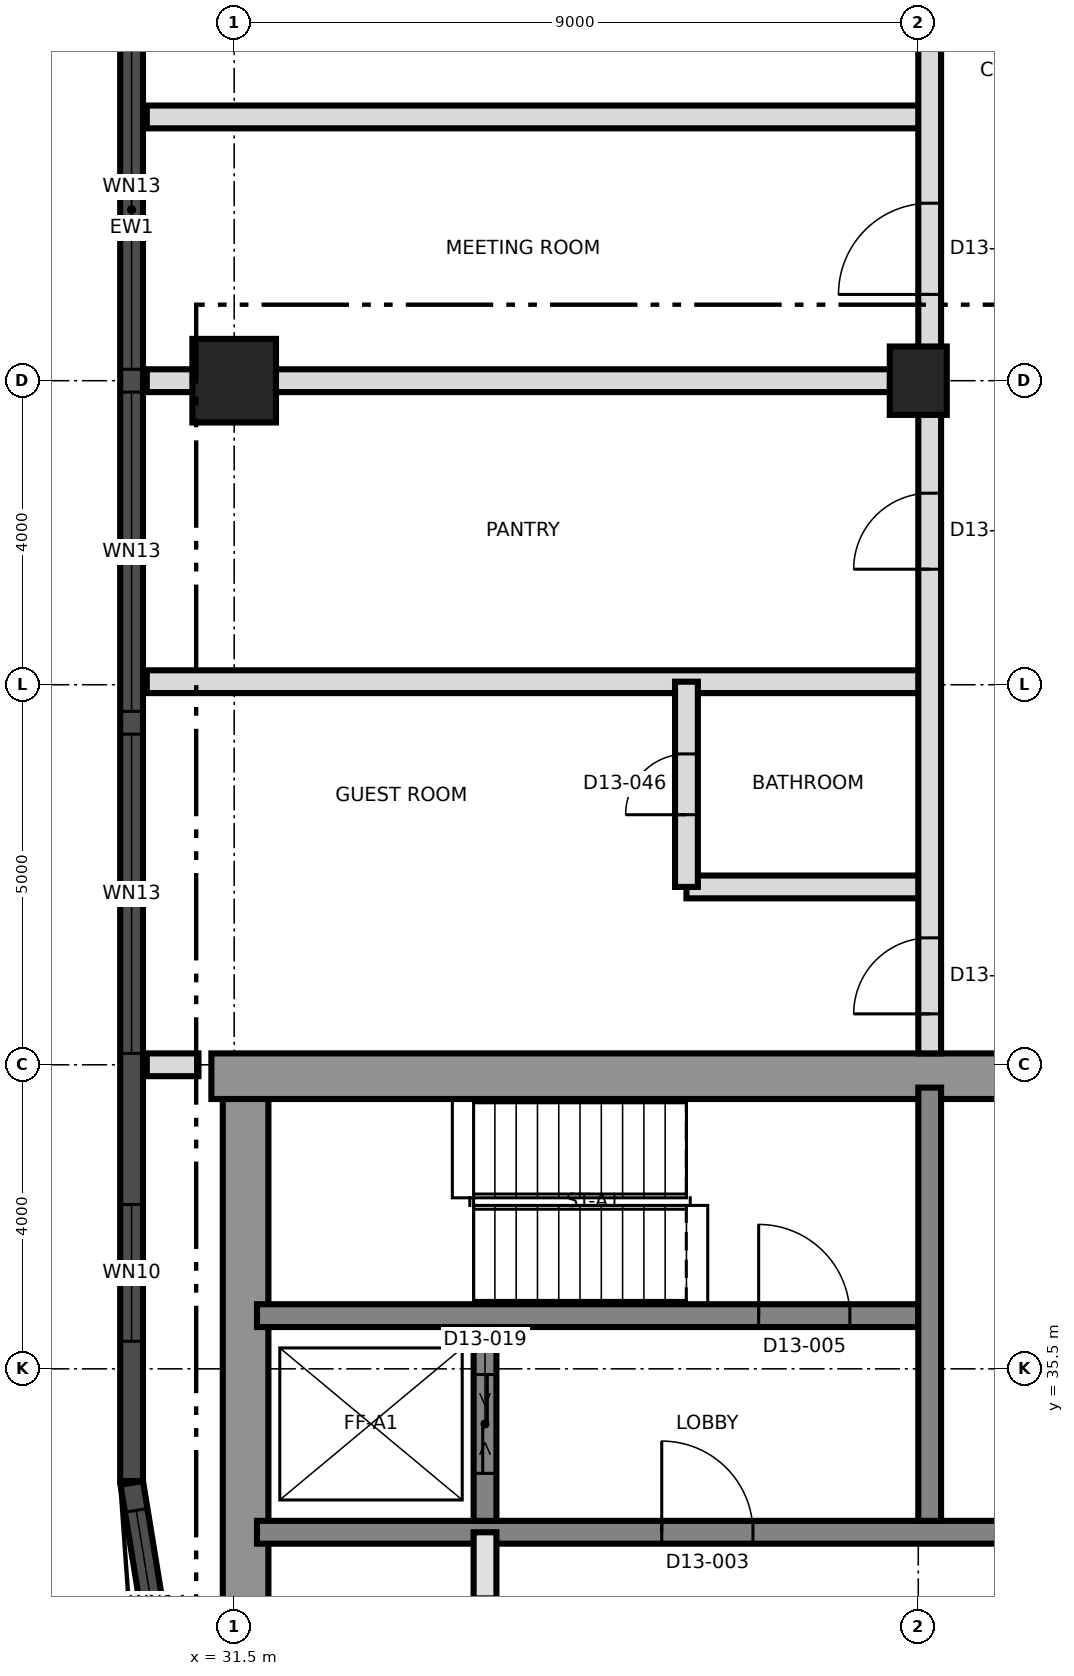
"""IFC4 building model, lengths in metres.
Left out: names, types, materials, properties, quantities, classifications, styles, units other than length and angle.
Written with IfcOpenShell. Run it as: python <this file> out.ifc"""

import sys

from ifc_helpers import new_model, si_unit, direction, frame, frame_2d, origin, origin_2d, place, context, subcontext, project, spatial, rectangle, extrude, element, fill, save


model = new_model("IFC4")
c1 = context("Model", 3, precision=1e-05, world=origin(), true_north=direction((0.0, 1.0)))
c2 = subcontext(c1, "Body", "Model", "MODEL_VIEW")
j1 = project(units=[si_unit("LENGTHUNIT", "METRE"), si_unit("PLANEANGLEUNIT", "RADIAN")], contexts=[c1])
p1 = place(None, origin())
s1 = spatial("IfcSite", under=j1, at=p1, CompositionType="ELEMENT")
p2 = place(p1, origin())
s2 = spatial("IfcBuilding", under=s1, at=p2, CompositionType="ELEMENT")
p3 = place(p2, frame((0.0, 0.0, 145.9)))
s3 = spatial("IfcBuildingStorey", under=s2, at=p3, CompositionType="ELEMENT", Elevation=145.9)
p4 = place(p3, frame((31.65, 21.8, 0.0), z_axis=(0.0, 0.0, 1.0), x_axis=(0.0, 1.0, 0.0)))
e1 = element("IfcWall", 1, at=p4, inside=s3, PredefinedType="SHEAR", context=c2, shape_type="SweptSolid", body=[
    extrude(rectangle(XDim=17.4, YDim=0.6, at=frame_2d((8.7, 0.0))), origin(), (0.0, 0.0, 1.0), 3.7),
])
p5 = place(p3, frame((31.2, 39.35, 0.0), z_axis=(0.0, 0.0, 1.0), x_axis=(1.0, 0.0, 0.0)))
e2 = element("IfcWall", 2, at=p5, inside=s3, PredefinedType="SHEAR", context=c2, shape_type="SweptSolid", body=[
    extrude(rectangle(XDim=27.0, YDim=0.6, at=frame_2d((13.5, 0.0))), origin(), (0.0, 0.0, 1.0), 3.7),
])
p6 = place(p5, frame((10.5, 0.0, 0.0)))
e3 = element("IfcOpeningElement", 3, at=p6, cuts=e2, PredefinedType="OPENING", context=c2, shape_type="SweptSolid", body=[
    extrude(rectangle(XDim=1.2, YDim=2.1, at=frame_2d((0.6, 1.05))), frame((0.0, 0.31, 0.0), z_axis=(0.0, -1.0, 0.0), x_axis=(1.0, 0.0, 0.0)), (0.0, 0.0, 1.0), 0.62),
])
p7 = place(p3, frame((31.8, 33.35, 0.0), z_axis=(0.0, 0.0, 1.0), x_axis=(1.0, 0.0, 0.0)))
e4 = element("IfcWall", 4, at=p7, inside=s3, PredefinedType="SHEAR", context=c2, shape_type="SweptSolid", body=[
    extrude(rectangle(XDim=26.4, YDim=0.3, at=frame_2d((13.2, 0.0))), origin(), (0.0, 0.0, 1.0), 3.7),
])
p8 = place(p7, frame((13.85, 0.0, 0.0)))
e5 = element("IfcOpeningElement", 5, at=p8, cuts=e4, PredefinedType="OPENING", context=c2, shape_type="SweptSolid", body=[
    extrude(rectangle(XDim=1.4, YDim=2.1, at=frame_2d((0.7, 1.05))), frame((0.0, 0.16, 0.0), z_axis=(0.0, -1.0, 0.0), x_axis=(1.0, 0.0, 0.0)), (0.0, 0.0, 1.0), 0.32),
])
p9 = place(p7, frame((5.325, 0.0, 0.0)))
e6 = element("IfcOpeningElement", 6, at=p9, cuts=e4, PredefinedType="OPENING", context=c2, shape_type="SweptSolid", body=[
    extrude(rectangle(XDim=1.2, YDim=2.1, at=frame_2d((0.6, 1.05))), frame((0.0, 0.16, 0.0), z_axis=(0.0, -1.0, 0.0), x_axis=(1.0, 0.0, 0.0)), (0.0, 0.0, 1.0), 0.32),
])
p10 = place(p7, frame((19.875, 0.0, 0.0)))
e7 = element("IfcOpeningElement", 7, at=p10, cuts=e4, PredefinedType="OPENING", context=c2, shape_type="SweptSolid", body=[
    extrude(rectangle(XDim=1.2, YDim=2.1, at=frame_2d((0.6, 1.05))), frame((0.0, 0.16, 0.0), z_axis=(0.0, -1.0, 0.0), x_axis=(1.0, 0.0, 0.0)), (0.0, 0.0, 1.0), 0.32),
])
p11 = place(p3, frame((31.8, 36.2, 0.0), z_axis=(0.0, 0.0, 1.0), x_axis=(1.0, 0.0, 0.0)))
e8 = element("IfcWall", 8, at=p11, inside=s3, PredefinedType="SHEAR", context=c2, shape_type="SweptSolid", body=[
    extrude(rectangle(XDim=8.7, YDim=0.3, at=frame_2d((4.35, 0.0))), origin(), (0.0, 0.0, 1.0), 3.7),
])
p12 = place(p11, frame((6.6, 0.0, 0.0)))
e9 = element("IfcOpeningElement", 9, at=p12, cuts=e8, PredefinedType="OPENING", context=c2, shape_type="SweptSolid", body=[
    extrude(rectangle(XDim=1.2, YDim=2.1, at=frame_2d((0.6, 1.05))), frame((0.0, 0.16, 0.0), z_axis=(0.0, -1.0, 0.0), x_axis=(1.0, 0.0, 0.0)), (0.0, 0.0, 1.0), 0.32),
])
p13 = place(p3, frame((40.65, 33.5, 0.0), z_axis=(0.0, 0.0, 1.0), x_axis=(0.0, 1.0, 0.0)))
e10 = element("IfcWall", 10, at=p13, inside=s3, PredefinedType="SHEAR", context=c2, shape_type="SweptSolid", body=[
    extrude(rectangle(XDim=5.7, YDim=0.3, at=frame_2d((2.85, 0.0))), origin(), (0.0, 0.0, 1.0), 3.7),
])
p14 = place(p3, frame((34.8, 33.5, 0.0), z_axis=(0.0, 0.0, 1.0), x_axis=(0.0, 1.0, 0.0)))
e11 = element("IfcWall", 11, at=p14, inside=s3, PredefinedType="SHEAR", context=c2, shape_type="SweptSolid", body=[
    extrude(rectangle(XDim=2.55, YDim=0.3, at=frame_2d((1.275, 0.0))), origin(), (0.0, 0.0, 1.0), 3.7),
])
p15 = place(p14, frame((0.625, 0.0, 0.0)))
e12 = element("IfcOpeningElement", 12, at=p15, cuts=e11, PredefinedType="OPENING", context=c2, shape_type="SweptSolid", body=[
    extrude(rectangle(XDim=1.3, YDim=2.4, at=frame_2d((0.65, 1.2))), frame((0.0, 0.16, 0.0), z_axis=(0.0, -1.0, 0.0), x_axis=(1.0, 0.0, 0.0)), (0.0, 0.0, 1.0), 0.32),
])
p16 = place(p3, frame((31.5, 48.5, 0.0), z_axis=(0.0, 0.0, 1.0), x_axis=(1.0, 0.0, 0.0)))
e13 = element("IfcColumn", 13, at=p16, inside=s3, PredefinedType="COLUMN", context=c2, shape_type="SweptSolid", body=[
    extrude(rectangle(XDim=1.1, YDim=1.1, at=origin_2d()), origin(), (0.0, 0.0, 1.0), 3.7),
])
p17 = place(p3, frame((40.5, 48.5, 0.0), z_axis=(0.0, 0.0, 1.0), x_axis=(0.0, 1.0, 0.0)))
e14 = element("IfcColumn", 14, at=p17, inside=s3, PredefinedType="COLUMN", context=c2, shape_type="SweptSolid", body=[
    extrude(rectangle(XDim=0.9, YDim=0.75, at=origin_2d()), origin(), (0.0, 0.0, 1.0), 3.7),
])
p18 = place(p3, frame((30.15, 66.992, 0.0), z_axis=(0.0, 0.0, 1.0), x_axis=(0.0, -1.0, 0.0)))
e15 = element("IfcWall", 15, at=p18, inside=s3, PredefinedType="SOLIDWALL", context=c2, shape_type="SweptSolid", body=[
    extrude(rectangle(XDim=32.968, YDim=0.3, at=frame_2d((16.484, 0.0))), origin(), (0.0, 0.0, 1.0), 3.4),
])
p19 = place(p18, frame((1.596, 0.0, 0.3)))
e16 = element("IfcOpeningElement", 16, at=p19, cuts=e15, PredefinedType="OPENING", context=c2, shape_type="SweptSolid", body=[
    extrude(rectangle(XDim=1.8, YDim=2.4, at=frame_2d((0.9, 1.2))), frame((0.0, 0.16, 0.0), z_axis=(0.0, -1.0, 0.0), x_axis=(1.0, 0.0, 0.0)), (0.0, 0.0, 1.0), 0.32),
])
p20 = place(p18, frame((5.142, 0.0, 0.9)))
e17 = element("IfcOpeningElement", 17, at=p20, cuts=e15, PredefinedType="OPENING", context=c2, shape_type="SweptSolid", body=[
    extrude(rectangle(XDim=4.2, YDim=1.7, at=frame_2d((2.1, 0.85))), frame((0.0, 0.16, 0.0), z_axis=(0.0, -1.0, 0.0), x_axis=(1.0, 0.0, 0.0)), (0.0, 0.0, 1.0), 0.32),
])
p21 = place(p18, frame((9.642, 0.0, 0.9)))
e18 = element("IfcOpeningElement", 18, at=p21, cuts=e15, PredefinedType="OPENING", context=c2, shape_type="SweptSolid", body=[
    extrude(rectangle(XDim=4.2, YDim=1.7, at=frame_2d((2.1, 0.85))), frame((0.0, 0.16, 0.0), z_axis=(0.0, -1.0, 0.0), x_axis=(1.0, 0.0, 0.0)), (0.0, 0.0, 1.0), 0.32),
])
p22 = place(p18, frame((14.142, 0.0, 0.9)))
e19 = element("IfcOpeningElement", 19, at=p22, cuts=e15, PredefinedType="OPENING", context=c2, shape_type="SweptSolid", body=[
    extrude(rectangle(XDim=4.2, YDim=1.7, at=frame_2d((2.1, 0.85))), frame((0.0, 0.16, 0.0), z_axis=(0.0, -1.0, 0.0), x_axis=(1.0, 0.0, 0.0)), (0.0, 0.0, 1.0), 0.32),
])
p23 = place(p18, frame((18.642, 0.0, 0.9)))
e20 = element("IfcOpeningElement", 20, at=p23, cuts=e15, PredefinedType="OPENING", context=c2, shape_type="SweptSolid", body=[
    extrude(rectangle(XDim=4.2, YDim=1.7, at=frame_2d((2.1, 0.85))), frame((0.0, 0.16, 0.0), z_axis=(0.0, -1.0, 0.0), x_axis=(1.0, 0.0, 0.0)), (0.0, 0.0, 1.0), 0.32),
])
p24 = place(p18, frame((23.142, 0.0, 0.9)))
e21 = element("IfcOpeningElement", 21, at=p24, cuts=e15, PredefinedType="OPENING", context=c2, shape_type="SweptSolid", body=[
    extrude(rectangle(XDim=4.2, YDim=1.7, at=frame_2d((2.1, 0.85))), frame((0.0, 0.16, 0.0), z_axis=(0.0, -1.0, 0.0), x_axis=(1.0, 0.0, 0.0)), (0.0, 0.0, 1.0), 0.32),
])
p25 = place(p18, frame((29.33, 0.0, 0.3)))
e22 = element("IfcOpeningElement", 22, at=p25, cuts=e15, PredefinedType="OPENING", context=c2, shape_type="SweptSolid", body=[
    extrude(rectangle(XDim=1.8, YDim=2.4, at=frame_2d((0.9, 1.2))), frame((0.0, 0.16, 0.0), z_axis=(0.0, -1.0, 0.0), x_axis=(1.0, 0.0, 0.0)), (0.0, 0.0, 1.0), 0.32),
])
p26 = place(p3, frame((30.152, 34.0, 0.0), z_axis=(0.0, 0.0, 1.0), x_axis=(0.160697303067, -0.987003736967, 0.0)))
e23 = element("IfcWall", 23, at=p26, inside=s3, PredefinedType="SOLIDWALL", context=c2, shape_type="SweptSolid", body=[
    extrude(rectangle(XDim=4.333, YDim=0.3, at=frame_2d((2.167, 0.0))), origin(), (0.0, 0.0, 1.0), 3.4),
])
p27 = place(p26, frame((0.366, 0.0, 0.9)))
e24 = element("IfcOpeningElement", 24, at=p27, cuts=e23, PredefinedType="OPENING", context=c2, shape_type="SweptSolid", body=[
    extrude(rectangle(XDim=3.6, YDim=1.7, at=frame_2d((1.8, 0.85))), frame((0.0, 0.16, 0.0), z_axis=(0.0, -1.0, 0.0), x_axis=(1.0, 0.0, 0.0)), (0.0, 0.0, 1.0), 0.32),
])
p28 = place(p3, frame((34.8, 30.65, 0.0), z_axis=(0.0, 0.0, 1.0), x_axis=(0.0, 1.0, 0.0)))
e25 = element("IfcWall", 25, at=p28, inside=s3, PredefinedType="SOLIDWALL", context=c2, shape_type="SweptSolid", body=[
    extrude(rectangle(XDim=2.7, YDim=0.3, at=frame_2d((1.35, 0.0))), origin(), (0.0, 0.0, 1.0), 3.4),
])
p29 = place(p28, frame((0.85, 0.0, 0.0)))
e26 = element("IfcOpeningElement", 26, at=p29, cuts=e25, PredefinedType="OPENING", context=c2, shape_type="SweptSolid", body=[
    extrude(rectangle(XDim=1.0, YDim=2.1, at=frame_2d((0.5, 1.05))), frame((0.0, 0.16, 0.0), z_axis=(0.0, -1.0, 0.0), x_axis=(1.0, 0.0, 0.0)), (0.0, 0.0, 1.0), 0.32),
])
p30 = place(p3, frame((30.35, 39.5, 0.0), z_axis=(0.0, 0.0, 1.0), x_axis=(1.0, 0.0, 0.0)))
e27 = element("IfcWall", 27, at=p30, inside=s3, PredefinedType="PARTITIONING", context=c2, shape_type="SweptSolid", body=[
    extrude(rectangle(XDim=0.68, YDim=0.3, at=frame_2d((0.34, 0.0))), origin(), (0.0, 0.0, 1.0), 3.4),
])
p31 = place(p3, frame((37.45, 41.84, 0.0), z_axis=(0.0, 0.0, 1.0), x_axis=(1.0, 0.0, 0.0)))
e28 = element("IfcWall", 28, at=p31, inside=s3, PredefinedType="PARTITIONING", context=c2, shape_type="SweptSolid", body=[
    extrude(rectangle(XDim=3.2, YDim=0.3, at=frame_2d((1.6, 0.0))), origin(), (0.0, 0.0, 1.0), 3.4),
])
for number, where, z_axis, x_axis in (
    (29, (30.35, 44.54, 0.0), (0.0, 0.0, 1.0), (1.0, 0.0, 0.0)),
    (30, (30.35, 48.5, 0.0), (0.0, 0.0, 1.0), (1.0, 0.0, 0.0)),
    (31, (30.35, 51.97, 0.0), (0.0, 0.0, 1.0), (1.0, 0.0, 0.0)),
):
    element("IfcWall", number, at=place(p3, frame(where, z_axis=z_axis, x_axis=x_axis)), inside=s3, PredefinedType="PARTITIONING", context=c2, shape_type="SweptSolid", body=[
        extrude(rectangle(XDim=10.3, YDim=0.3, at=frame_2d((5.15, 0.0))), origin(), (0.0, 0.0, 1.0), 3.4),
    ])
p32 = place(p3, frame((37.45, 41.84, 0.0), z_axis=(0.0, 0.0, 1.0), x_axis=(0.0, 1.0, 0.0)))
e32 = element("IfcWall", 32, at=p32, inside=s3, PredefinedType="PARTITIONING", context=c2, shape_type="SweptSolid", body=[
    extrude(rectangle(XDim=2.7, YDim=0.3, at=frame_2d((1.35, 0.0))), origin(), (0.0, 0.0, 1.0), 3.4),
])
p33 = place(p32, frame((0.95, 0.0, 0.0)))
e33 = element("IfcOpeningElement", 33, at=p33, cuts=e32, PredefinedType="OPENING", context=c2, shape_type="SweptSolid", body=[
    extrude(rectangle(XDim=0.8, YDim=2.1, at=frame_2d((0.4, 1.05))), frame((0.0, 0.16, 0.0), z_axis=(0.0, -1.0, 0.0), x_axis=(1.0, 0.0, 0.0)), (0.0, 0.0, 1.0), 0.32),
])
p34 = place(p3, frame((40.65, 39.65, 0.0), z_axis=(0.0, 0.0, 1.0), x_axis=(0.0, 1.0, 0.0)))
e34 = element("IfcWall", 34, at=p34, inside=s3, PredefinedType="PARTITIONING", context=c2, shape_type="SweptSolid", body=[
    extrude(rectangle(XDim=37.24, YDim=0.3, at=frame_2d((18.62, 0.0))), origin(), (0.0, 0.0, 1.0), 3.4),
])
p35 = place(p34, frame((0.52, 0.0, 0.0)))
e35 = element("IfcOpeningElement", 35, at=p35, cuts=e34, PredefinedType="OPENING", context=c2, shape_type="SweptSolid", body=[
    extrude(rectangle(XDim=1.0, YDim=2.1, at=frame_2d((0.5, 1.05))), frame((0.0, 0.16, 0.0), z_axis=(0.0, -1.0, 0.0), x_axis=(1.0, 0.0, 0.0)), (0.0, 0.0, 1.0), 0.32),
])
p36 = place(p34, frame((6.37, 0.0, 0.0)))
e36 = element("IfcOpeningElement", 36, at=p36, cuts=e34, PredefinedType="OPENING", context=c2, shape_type="SweptSolid", body=[
    extrude(rectangle(XDim=1.0, YDim=2.1, at=frame_2d((0.5, 1.05))), frame((0.0, 0.16, 0.0), z_axis=(0.0, -1.0, 0.0), x_axis=(1.0, 0.0, 0.0)), (0.0, 0.0, 1.0), 0.32),
])
p37 = place(p34, frame((9.985, 0.0, 0.0)))
e37 = element("IfcOpeningElement", 37, at=p37, cuts=e34, PredefinedType="OPENING", context=c2, shape_type="SweptSolid", body=[
    extrude(rectangle(XDim=1.2, YDim=2.1, at=frame_2d((0.6, 1.05))), frame((0.0, 0.16, 0.0), z_axis=(0.0, -1.0, 0.0), x_axis=(1.0, 0.0, 0.0)), (0.0, 0.0, 1.0), 0.32),
])
p38 = place(p34, frame((13.235, 0.0, 0.0)))
e38 = element("IfcOpeningElement", 38, at=p38, cuts=e34, PredefinedType="OPENING", context=c2, shape_type="SweptSolid", body=[
    extrude(rectangle(XDim=1.0, YDim=2.1, at=frame_2d((0.5, 1.05))), frame((0.0, 0.16, 0.0), z_axis=(0.0, -1.0, 0.0), x_axis=(1.0, 0.0, 0.0)), (0.0, 0.0, 1.0), 0.32),
])
p39 = place(p34, frame((21.35, 0.0, 0.0)))
e39 = element("IfcOpeningElement", 39, at=p39, cuts=e34, PredefinedType="OPENING", context=c2, shape_type="SweptSolid", body=[
    extrude(rectangle(XDim=1.0, YDim=2.4, at=frame_2d((0.5, 1.2))), frame((0.0, 0.16, 0.0), z_axis=(0.0, -1.0, 0.0), x_axis=(1.0, 0.0, 0.0)), (0.0, 0.0, 1.0), 0.32),
])
p40 = place(p22, origin())
e40 = element("IfcWindow", 40, at=p40, inside=s3, PartitioningType="SINGLE_PANEL", PredefinedType="WINDOW", context=c2, shape_type="SweptSolid", body=[
    extrude(rectangle(XDim=4.2, YDim=1.7, at=frame_2d((2.1, 0.85))), frame((0.0, 0.03, 0.0), z_axis=(0.0, -1.0, 0.0), x_axis=(1.0, 0.0, 0.0)), (0.0, 0.0, 1.0), 0.06),
])
fill(e19, e40)
p41 = place(p23, origin())
e41 = element("IfcWindow", 41, at=p41, inside=s3, PartitioningType="SINGLE_PANEL", PredefinedType="WINDOW", context=c2, shape_type="SweptSolid", body=[
    extrude(rectangle(XDim=4.2, YDim=1.7, at=frame_2d((2.1, 0.85))), frame((0.0, 0.03, 0.0), z_axis=(0.0, -1.0, 0.0), x_axis=(1.0, 0.0, 0.0)), (0.0, 0.0, 1.0), 0.06),
])
fill(e20, e41)
p42 = place(p24, origin())
e42 = element("IfcWindow", 42, at=p42, inside=s3, PartitioningType="SINGLE_PANEL", PredefinedType="WINDOW", context=c2, shape_type="SweptSolid", body=[
    extrude(rectangle(XDim=4.2, YDim=1.7, at=frame_2d((2.1, 0.85))), frame((0.0, 0.03, 0.0), z_axis=(0.0, -1.0, 0.0), x_axis=(1.0, 0.0, 0.0)), (0.0, 0.0, 1.0), 0.06),
])
fill(e21, e42)
p43 = place(p25, origin())
e43 = element("IfcWindow", 43, at=p43, inside=s3, PartitioningType="SINGLE_PANEL", PredefinedType="WINDOW", context=c2, shape_type="SweptSolid", body=[
    extrude(rectangle(XDim=1.8, YDim=2.4, at=frame_2d((0.9, 1.2))), frame((0.0, 0.03, 0.0), z_axis=(0.0, -1.0, 0.0), x_axis=(1.0, 0.0, 0.0)), (0.0, 0.0, 1.0), 0.06),
])
fill(e22, e43)
p44 = place(p27, origin())
e44 = element("IfcWindow", 44, at=p44, inside=s3, PartitioningType="SINGLE_PANEL", PredefinedType="WINDOW", context=c2, shape_type="SweptSolid", body=[
    extrude(rectangle(XDim=3.6, YDim=1.7, at=frame_2d((1.8, 0.85))), frame((0.0, 0.03, 0.0), z_axis=(0.0, -1.0, 0.0), x_axis=(1.0, 0.0, 0.0)), (0.0, 0.0, 1.0), 0.06),
])
fill(e24, e44)
p45 = place(p9, origin())
e45 = element("IfcDoor", 45, at=p45, inside=s3, OperationType="SINGLE_SWING_LEFT", PredefinedType="DOOR", context=c2, shape_type="SweptSolid", body=[
    extrude(rectangle(XDim=1.2, YDim=2.1, at=frame_2d((0.6, 1.05))), frame((0.0, 0.025, 0.0), z_axis=(0.0, -1.0, 0.0), x_axis=(1.0, 0.0, 0.0)), (0.0, 0.0, 1.0), 0.05),
])
fill(e6, e45)
p46 = place(p12, origin())
e46 = element("IfcDoor", 46, at=p46, inside=s3, OperationType="SINGLE_SWING_RIGHT", PredefinedType="DOOR", context=c2, shape_type="SweptSolid", body=[
    extrude(rectangle(XDim=1.2, YDim=2.1, at=frame_2d((0.6, 1.05))), frame((0.0, 0.025, 0.0), z_axis=(0.0, -1.0, 0.0), x_axis=(1.0, 0.0, 0.0)), (0.0, 0.0, 1.0), 0.05),
])
fill(e9, e46)
p47 = place(p15, origin())
e47 = element("IfcDoor", 47, at=p47, inside=s3, OperationType="SLIDING_TO_LEFT", PredefinedType="DOOR", context=c2, shape_type="SweptSolid", body=[
    extrude(rectangle(XDim=1.3, YDim=2.4, at=frame_2d((0.65, 1.2))), frame((0.0, 0.025, 0.0), z_axis=(0.0, -1.0, 0.0), x_axis=(1.0, 0.0, 0.0)), (0.0, 0.0, 1.0), 0.05),
])
fill(e12, e47)
p48 = place(p33, origin())
e48 = element("IfcDoor", 48, at=p48, inside=s3, OperationType="SINGLE_SWING_LEFT", PredefinedType="DOOR", context=c2, shape_type="SweptSolid", body=[
    extrude(rectangle(XDim=0.8, YDim=2.1, at=frame_2d((0.4, 1.05))), frame((0.0, 0.025, 0.0), z_axis=(0.0, -1.0, 0.0), x_axis=(1.0, 0.0, 0.0)), (0.0, 0.0, 1.0), 0.05),
])
fill(e33, e48)
p49 = place(p35, origin())
e49 = element("IfcDoor", 49, at=p49, inside=s3, OperationType="SINGLE_SWING_RIGHT", PredefinedType="DOOR", context=c2, shape_type="SweptSolid", body=[
    extrude(rectangle(XDim=1.0, YDim=2.1, at=frame_2d((0.5, 1.05))), frame((0.0, 0.025, 0.0), z_axis=(0.0, -1.0, 0.0), x_axis=(1.0, 0.0, 0.0)), (0.0, 0.0, 1.0), 0.05),
])
fill(e35, e49)
p50 = place(p36, origin())
e50 = element("IfcDoor", 50, at=p50, inside=s3, OperationType="SINGLE_SWING_LEFT", PredefinedType="DOOR", context=c2, shape_type="SweptSolid", body=[
    extrude(rectangle(XDim=1.0, YDim=2.1, at=frame_2d((0.5, 1.05))), frame((0.0, 0.025, 0.0), z_axis=(0.0, -1.0, 0.0), x_axis=(1.0, 0.0, 0.0)), (0.0, 0.0, 1.0), 0.05),
])
fill(e36, e50)
p51 = place(p37, origin())
e51 = element("IfcDoor", 51, at=p51, inside=s3, OperationType="SINGLE_SWING_LEFT", PredefinedType="DOOR", context=c2, shape_type="SweptSolid", body=[
    extrude(rectangle(XDim=1.2, YDim=2.1, at=frame_2d((0.6, 1.05))), frame((0.0, 0.025, 0.0), z_axis=(0.0, -1.0, 0.0), x_axis=(1.0, 0.0, 0.0)), (0.0, 0.0, 1.0), 0.05),
])
fill(e37, e51)
save(model, sys.argv[1])
